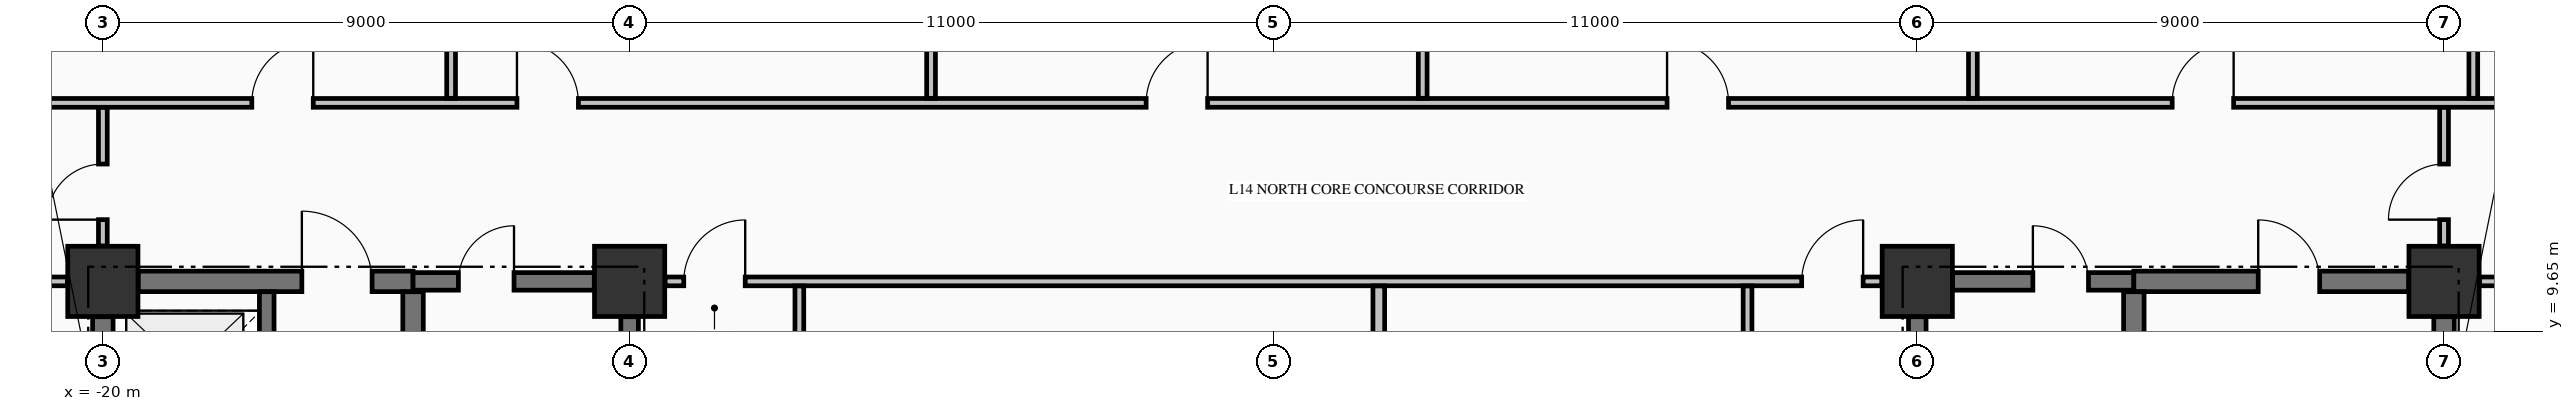
"""IFC4 building model, lengths in metres.
Left out: names, types, materials, properties, quantities, classifications, styles, units other than length and angle.
Written with IfcOpenShell. Run it as: python <this file> out.ifc"""

import sys

from ifc_helpers import new_model, si_unit, direction, frame, frame_2d, origin, origin_2d, place, context, subcontext, project, spatial, rectangle, extrude, element, fill, save


model = new_model("IFC4")
c1 = context("Model", 3, precision=1e-05, world=origin(), true_north=direction((0.0, 1.0)))
c2 = subcontext(c1, "Body", "Model", "MODEL_VIEW")
j1 = project(units=[si_unit("LENGTHUNIT", "METRE"), si_unit("PLANEANGLEUNIT", "RADIAN")], contexts=[c1])
p1 = place(None, origin())
s1 = spatial("IfcSite", under=j1, at=p1, CompositionType="ELEMENT")
p2 = place(p1, origin())
s2 = spatial("IfcBuilding", under=s1, at=p2, CompositionType="ELEMENT")
p3 = place(p2, frame((0.0, 0.0, 60.76)))
s3 = spatial("IfcBuildingStorey", under=s2, at=p3, CompositionType="ELEMENT", Elevation=60.76)
for number, where, z_axis, x_axis in (
    (1, (-20.0, 10.5, -0.3), (0.0, 0.0, 1.0), (1.0, 0.0, 0.0)),
    (2, (-11.0, 10.5, -0.3), (0.0, 0.0, 1.0), (1.0, 0.0, 0.0)),
    (3, (11.0, 10.5, -0.3), (0.0, 0.0, 1.0), (1.0, 0.0, 0.0)),
    (4, (20.0, 10.5, -0.3), (0.0, 0.0, 1.0), (1.0, 0.0, 0.0)),
):
    element("IfcColumn", number, at=place(p3, frame(where, z_axis=z_axis, x_axis=x_axis)), inside=s3, PredefinedType="COLUMN", context=c2, shape_type="SweptSolid", body=[
        extrude(rectangle(XDim=1.2, YDim=1.2, at=origin_2d()), origin(), (0.0, 0.0, 1.0), 3.62),
    ])
p4 = place(p3, frame((-19.396, 10.5, 0.0), z_axis=(0.0, 0.0, 1.0), x_axis=(1.0, 0.0, 0.0)))
e5 = element("IfcWall", 5, at=p4, inside=s3, PredefinedType="SHEAR", context=c2, shape_type="SweptSolid", body=[
    extrude(rectangle(XDim=4.696, YDim=0.35, at=frame_2d((2.348, 0.0))), origin(), (0.0, 0.0, 1.0), 3.32),
])
p5 = place(p4, frame((2.796, 0.0, 0.0)))
e6 = element("IfcOpeningElement", 6, at=p5, cuts=e5, PredefinedType="OPENING", context=c2, shape_type="SweptSolid", body=[
    extrude(rectangle(XDim=1.2, YDim=2.15, at=frame_2d((0.6, 1.075))), frame((0.0, 0.185, 0.0), z_axis=(0.0, -1.0, 0.0), x_axis=(1.0, 0.0, 0.0)), (0.0, 0.0, 1.0), 0.37),
])
p6 = place(p3, frame((-14.7, 10.5, 0.0), z_axis=(0.0, 0.0, 1.0), x_axis=(1.0, 0.0, 0.0)))
e7 = element("IfcWall", 7, at=p6, inside=s3, PredefinedType="SHEAR", context=c2, shape_type="SweptSolid", body=[
    extrude(rectangle(XDim=3.096, YDim=0.3, at=frame_2d((1.548, 0.0))), origin(), (0.0, 0.0, 1.0), 3.32),
])
p7 = place(p6, frame((0.775, 0.0, 0.0)))
e8 = element("IfcOpeningElement", 8, at=p7, cuts=e7, PredefinedType="OPENING", context=c2, shape_type="SweptSolid", body=[
    extrude(rectangle(XDim=0.95, YDim=2.15, at=frame_2d((0.475, 1.075))), frame((0.0, 0.16, 0.0), z_axis=(0.0, -1.0, 0.0), x_axis=(1.0, 0.0, 0.0)), (0.0, 0.0, 1.0), 0.32),
])
p8 = place(p3, frame((11.604, 10.5, 0.0), z_axis=(0.0, 0.0, 1.0), x_axis=(1.0, 0.0, 0.0)))
e9 = element("IfcWall", 9, at=p8, inside=s3, PredefinedType="SHEAR", context=c2, shape_type="SweptSolid", body=[
    extrude(rectangle(XDim=3.096, YDim=0.3, at=frame_2d((1.548, 0.0))), origin(), (0.0, 0.0, 1.0), 3.32),
])
p9 = place(p8, frame((1.371, 0.0, 0.0)))
e10 = element("IfcOpeningElement", 10, at=p9, cuts=e9, PredefinedType="OPENING", context=c2, shape_type="SweptSolid", body=[
    extrude(rectangle(XDim=0.95, YDim=2.15, at=frame_2d((0.475, 1.075))), frame((0.0, 0.16, 0.0), z_axis=(0.0, -1.0, 0.0), x_axis=(1.0, 0.0, 0.0)), (0.0, 0.0, 1.0), 0.32),
])
p10 = place(p3, frame((14.7, 10.5, 0.0), z_axis=(0.0, 0.0, 1.0), x_axis=(1.0, 0.0, 0.0)))
e11 = element("IfcWall", 11, at=p10, inside=s3, PredefinedType="SHEAR", context=c2, shape_type="SweptSolid", body=[
    extrude(rectangle(XDim=4.696, YDim=0.35, at=frame_2d((2.348, 0.0))), origin(), (0.0, 0.0, 1.0), 3.32),
])
p11 = place(p10, frame((2.125, 0.0, 0.0)))
e12 = element("IfcOpeningElement", 12, at=p11, cuts=e11, PredefinedType="OPENING", context=c2, shape_type="SweptSolid", body=[
    extrude(rectangle(XDim=1.05, YDim=2.15, at=frame_2d((0.525, 1.075))), frame((0.0, 0.185, 0.0), z_axis=(0.0, -1.0, 0.0), x_axis=(1.0, 0.0, 0.0)), (0.0, 0.0, 1.0), 0.37),
])
p12 = place(p3, frame((-28.835, 10.5, 0.0), z_axis=(0.0, 0.0, 1.0), x_axis=(1.0, 0.0, 0.0)))
e13 = element("IfcWall", 13, at=p12, inside=s3, PredefinedType="PARTITIONING", context=c2, shape_type="SweptSolid", body=[
    extrude(rectangle(XDim=8.229, YDim=0.15, at=frame_2d((4.115, 0.0))), origin(), (0.0, 0.0, 1.0), 3.32),
])
p13 = place(p12, frame((3.835, 0.0, 0.0)))
e14 = element("IfcOpeningElement", 14, at=p13, cuts=e13, PredefinedType="OPENING", context=c2, shape_type="SweptSolid", body=[
    extrude(rectangle(XDim=1.0, YDim=2.15, at=frame_2d((0.5, 1.075))), frame((0.0, 0.085, 0.0), z_axis=(0.0, -1.0, 0.0), x_axis=(1.0, 0.0, 0.0)), (0.0, 0.0, 1.0), 0.17),
])
p14 = place(p3, frame((-10.394, 10.5, 0.0), z_axis=(0.0, 0.0, 1.0), x_axis=(1.0, 0.0, 0.0)))
e15 = element("IfcWall", 15, at=p14, inside=s3, PredefinedType="PARTITIONING", context=c2, shape_type="SweptSolid", body=[
    extrude(rectangle(XDim=20.788, YDim=0.15, at=frame_2d((10.394, 0.0))), origin(), (0.0, 0.0, 1.0), 3.32),
])
p15 = place(p14, frame((0.319, 0.0, 0.0)))
e16 = element("IfcOpeningElement", 16, at=p15, cuts=e15, PredefinedType="OPENING", context=c2, shape_type="SweptSolid", body=[
    extrude(rectangle(XDim=1.05, YDim=2.15, at=frame_2d((0.525, 1.075))), frame((0.0, 0.085, 0.0), z_axis=(0.0, -1.0, 0.0), x_axis=(1.0, 0.0, 0.0)), (0.0, 0.0, 1.0), 0.17),
])
p16 = place(p14, frame((19.419, 0.0, 0.0)))
e17 = element("IfcOpeningElement", 17, at=p16, cuts=e15, PredefinedType="OPENING", context=c2, shape_type="SweptSolid", body=[
    extrude(rectangle(XDim=1.05, YDim=2.15, at=frame_2d((0.525, 1.075))), frame((0.0, 0.085, 0.0), z_axis=(0.0, -1.0, 0.0), x_axis=(1.0, 0.0, 0.0)), (0.0, 0.0, 1.0), 0.17),
])
p17 = place(p3, frame((20.606, 10.5, 0.0), z_axis=(0.0, 0.0, 1.0), x_axis=(1.0, 0.0, 0.0)))
e18 = element("IfcWall", 18, at=p17, inside=s3, PredefinedType="PARTITIONING", context=c2, shape_type="SweptSolid", body=[
    extrude(rectangle(XDim=3.229, YDim=0.15, at=frame_2d((1.615, 0.0))), origin(), (0.0, 0.0, 1.0), 3.32),
])
p18 = place(p17, frame((0.919, 0.0, 0.0)))
e19 = element("IfcOpeningElement", 19, at=p18, cuts=e18, PredefinedType="OPENING", context=c2, shape_type="SweptSolid", body=[
    extrude(rectangle(XDim=0.95, YDim=2.15, at=frame_2d((0.475, 1.075))), frame((0.0, 0.085, 0.0), z_axis=(0.0, -1.0, 0.0), x_axis=(1.0, 0.0, 0.0)), (0.0, 0.0, 1.0), 0.17),
])
p19 = place(p3, frame((-28.835, 13.55, 0.0), z_axis=(0.0, 0.0, 1.0), x_axis=(1.0, 0.0, 0.0)))
e20 = element("IfcWall", 20, at=p19, inside=s3, PredefinedType="PARTITIONING", context=c2, shape_type="SweptSolid", body=[
    extrude(rectangle(XDim=52.67, YDim=0.15, at=frame_2d((26.335, 0.0))), origin(), (0.0, 0.0, 1.0), 3.32),
])
p20 = place(p19, frame((11.38, 0.0, 0.0)))
e21 = element("IfcOpeningElement", 21, at=p20, cuts=e20, PredefinedType="OPENING", context=c2, shape_type="SweptSolid", body=[
    extrude(rectangle(XDim=1.05, YDim=2.15, at=frame_2d((0.525, 1.075))), frame((0.0, 0.085, 0.0), z_axis=(0.0, -1.0, 0.0), x_axis=(1.0, 0.0, 0.0)), (0.0, 0.0, 1.0), 0.17),
])
p21 = place(p19, frame((15.91, 0.0, 0.0)))
e22 = element("IfcOpeningElement", 22, at=p21, cuts=e20, PredefinedType="OPENING", context=c2, shape_type="SweptSolid", body=[
    extrude(rectangle(XDim=1.05, YDim=2.15, at=frame_2d((0.525, 1.075))), frame((0.0, 0.085, 0.0), z_axis=(0.0, -1.0, 0.0), x_axis=(1.0, 0.0, 0.0)), (0.0, 0.0, 1.0), 0.17),
])
p22 = place(p19, frame((26.66, 0.0, 0.0)))
e23 = element("IfcOpeningElement", 23, at=p22, cuts=e20, PredefinedType="OPENING", context=c2, shape_type="SweptSolid", body=[
    extrude(rectangle(XDim=1.05, YDim=2.15, at=frame_2d((0.525, 1.075))), frame((0.0, 0.085, 0.0), z_axis=(0.0, -1.0, 0.0), x_axis=(1.0, 0.0, 0.0)), (0.0, 0.0, 1.0), 0.17),
])
p23 = place(p19, frame((35.56, 0.0, 0.0)))
e24 = element("IfcOpeningElement", 24, at=p23, cuts=e20, PredefinedType="OPENING", context=c2, shape_type="SweptSolid", body=[
    extrude(rectangle(XDim=1.05, YDim=2.15, at=frame_2d((0.525, 1.075))), frame((0.0, 0.085, 0.0), z_axis=(0.0, -1.0, 0.0), x_axis=(1.0, 0.0, 0.0)), (0.0, 0.0, 1.0), 0.17),
])
p24 = place(p19, frame((44.19, 0.0, 0.0)))
e25 = element("IfcOpeningElement", 25, at=p24, cuts=e20, PredefinedType="OPENING", context=c2, shape_type="SweptSolid", body=[
    extrude(rectangle(XDim=1.05, YDim=2.15, at=frame_2d((0.525, 1.075))), frame((0.0, 0.085, 0.0), z_axis=(0.0, -1.0, 0.0), x_axis=(1.0, 0.0, 0.0)), (0.0, 0.0, 1.0), 0.17),
])
p25 = place(p3, frame((-20.0, 7.727, 0.0), z_axis=(0.0, 0.0, 1.0), x_axis=(0.0, 1.0, 0.0)))
e26 = element("IfcWall", 26, at=p25, inside=s3, PredefinedType="SHEAR", context=c2, shape_type="SweptSolid", body=[
    extrude(rectangle(XDim=2.169, YDim=0.35, at=frame_2d((1.084, 0.0))), origin(), (0.0, 0.0, 1.0), 3.32),
])
p26 = place(p3, frame((-17.2, 7.727, 0.0), z_axis=(0.0, 0.0, 1.0), x_axis=(0.0, 1.0, 0.0)))
e27 = element("IfcWall", 27, at=p26, inside=s3, PredefinedType="SOLIDWALL", context=c2, shape_type="SweptSolid", body=[
    extrude(rectangle(XDim=2.596, YDim=0.25, at=frame_2d((1.298, 0.0))), origin(), (0.0, 0.0, 1.0), 3.32),
])
p27 = place(p26, frame((0.773, 0.0, 0.0)))
e28 = element("IfcOpeningElement", 28, at=p27, cuts=e27, PredefinedType="OPENING", context=c2, shape_type="SweptSolid", body=[
    extrude(rectangle(XDim=1.1, YDim=2.2, at=frame_2d((0.55, 1.1))), frame((0.0, 0.135, 0.0), z_axis=(0.0, -1.0, 0.0), x_axis=(1.0, 0.0, 0.0)), (0.0, 0.0, 1.0), 0.27),
])
p28 = place(p3, frame((-14.7, 5.852, 0.0), z_axis=(0.0, 0.0, 1.0), x_axis=(0.0, 1.0, 0.0)))
e29 = element("IfcWall", 29, at=p28, inside=s3, PredefinedType="SHEAR", context=c2, shape_type="SweptSolid", body=[
    extrude(rectangle(XDim=4.471, YDim=0.35, at=frame_2d((2.235, 0.0))), origin(), (0.0, 0.0, 1.0), 3.32),
])
for number, where, z_axis, x_axis in (
    (30, (-11.0, 5.852, 0.0), (0.0, 0.0, 1.0), (0.0, 1.0, 0.0)),
    (31, (11.0, 5.852, 0.0), (0.0, 0.0, 1.0), (0.0, 1.0, 0.0)),
):
    element("IfcWall", number, at=place(p3, frame(where, z_axis=z_axis, x_axis=x_axis)), inside=s3, PredefinedType="SHEAR", context=c2, shape_type="SweptSolid", body=[
        extrude(rectangle(XDim=4.044, YDim=0.3, at=frame_2d((2.022, 0.0))), origin(), (0.0, 0.0, 1.0), 3.32),
    ])
p29 = place(p3, frame((14.7, 5.852, 0.0), z_axis=(0.0, 0.0, 1.0), x_axis=(0.0, 1.0, 0.0)))
e32 = element("IfcWall", 32, at=p29, inside=s3, PredefinedType="SHEAR", context=c2, shape_type="SweptSolid", body=[
    extrude(rectangle(XDim=4.471, YDim=0.35, at=frame_2d((2.235, 0.0))), origin(), (0.0, 0.0, 1.0), 3.32),
])
p30 = place(p3, frame((20.0, 0.604, 0.0), z_axis=(0.0, 0.0, 1.0), x_axis=(0.0, 1.0, 0.0)))
e33 = element("IfcWall", 33, at=p30, inside=s3, PredefinedType="SHEAR", context=c2, shape_type="SweptSolid", body=[
    extrude(rectangle(XDim=9.292, YDim=0.35, at=frame_2d((4.646, 0.0))), origin(), (0.0, 0.0, 1.0), 3.32),
])
p31 = place(p3, frame((-20.0, 11.106, 0.0), z_axis=(0.0, 0.0, 1.0), x_axis=(0.0, 1.0, 0.0)))
e34 = element("IfcWall", 34, at=p31, inside=s3, PredefinedType="PARTITIONING", context=c2, shape_type="SweptSolid", body=[
    extrude(rectangle(XDim=2.366, YDim=0.15, at=frame_2d((1.183, 0.0))), origin(), (0.0, 0.0, 1.0), 2.66),
])
p32 = place(p31, frame((0.449, 0.0, 0.0)))
e35 = element("IfcOpeningElement", 35, at=p32, cuts=e34, PredefinedType="OPENING", context=c2, shape_type="SweptSolid", body=[
    extrude(rectangle(XDim=0.95, YDim=2.15, at=frame_2d((0.475, 1.075))), frame((0.0, 0.085, 0.0), z_axis=(0.0, -1.0, 0.0), x_axis=(1.0, 0.0, 0.0)), (0.0, 0.0, 1.0), 0.17),
])
p33 = place(p3, frame((-14.05, 13.628, 0.0), z_axis=(0.0, 0.0, 1.0), x_axis=(0.0, 1.0, 0.0)))
e36 = element("IfcWall", 36, at=p33, inside=s3, PredefinedType="PARTITIONING", context=c2, shape_type="SweptSolid", body=[
    extrude(rectangle(XDim=12.707, YDim=0.15, at=frame_2d((6.354, 0.0))), origin(), (0.0, 0.0, 1.0), 3.32),
])
p34 = place(p3, frame((-8.1, -3.897, 0.0), z_axis=(0.0, 0.0, 1.0), x_axis=(0.0, 1.0, 0.0)))
e37 = element("IfcWall", 37, at=p34, inside=s3, PredefinedType="PARTITIONING", context=c2, shape_type="SweptSolid", body=[
    extrude(rectangle(XDim=14.319, YDim=0.15, at=frame_2d((7.16, 0.0))), origin(), (0.0, 0.0, 1.0), 3.32),
])
p35 = place(p34, frame((6.622, 0.0, 0.0)))
e38 = element("IfcOpeningElement", 38, at=p35, cuts=e37, PredefinedType="OPENING", context=c2, shape_type="SweptSolid", body=[
    extrude(rectangle(XDim=1.05, YDim=2.15, at=frame_2d((0.525, 1.075))), frame((0.0, 0.085, 0.0), z_axis=(0.0, -1.0, 0.0), x_axis=(1.0, 0.0, 0.0)), (0.0, 0.0, 1.0), 0.17),
])
p36 = place(p3, frame((-5.85, 13.628, 0.0), z_axis=(0.0, 0.0, 1.0), x_axis=(0.0, 1.0, 0.0)))
e39 = element("IfcWall", 39, at=p36, inside=s3, PredefinedType="PARTITIONING", context=c2, shape_type="SweptSolid", body=[
    extrude(rectangle(XDim=12.707, YDim=0.15, at=frame_2d((6.354, 0.0))), origin(), (0.0, 0.0, 1.0), 3.32),
])
p37 = place(p3, frame((1.8, 0.303, 0.0), z_axis=(0.0, 0.0, 1.0), x_axis=(0.0, 1.0, 0.0)))
e40 = element("IfcWall", 40, at=p37, inside=s3, PredefinedType="PARTITIONING", context=c2, shape_type="SweptSolid", body=[
    extrude(rectangle(XDim=10.119, YDim=0.2, at=frame_2d((5.06, 0.0))), origin(), (0.0, 0.0, 1.0), 3.32),
])
p38 = place(p3, frame((2.55, 13.628, 0.0), z_axis=(0.0, 0.0, 1.0), x_axis=(0.0, 1.0, 0.0)))
e41 = element("IfcWall", 41, at=p38, inside=s3, PredefinedType="PARTITIONING", context=c2, shape_type="SweptSolid", body=[
    extrude(rectangle(XDim=12.707, YDim=0.15, at=frame_2d((6.354, 0.0))), origin(), (0.0, 0.0, 1.0), 3.32),
])
p39 = place(p3, frame((8.1, 0.303, 0.0), z_axis=(0.0, 0.0, 1.0), x_axis=(0.0, 1.0, 0.0)))
e42 = element("IfcWall", 42, at=p39, inside=s3, PredefinedType="PARTITIONING", context=c2, shape_type="SweptSolid", body=[
    extrude(rectangle(XDim=10.119, YDim=0.15, at=frame_2d((5.06, 0.0))), origin(), (0.0, 0.0, 1.0), 3.32),
])
p40 = place(p39, frame((4.497, 0.0, 0.0)))
e43 = element("IfcOpeningElement", 43, at=p40, cuts=e42, PredefinedType="OPENING", context=c2, shape_type="SweptSolid", body=[
    extrude(rectangle(XDim=1.1, YDim=2.15, at=frame_2d((0.55, 1.075))), frame((0.0, 0.085, 0.0), z_axis=(0.0, -1.0, 0.0), x_axis=(1.0, 0.0, 0.0)), (0.0, 0.0, 1.0), 0.17),
])
p41 = place(p3, frame((11.95, 13.628, 0.0), z_axis=(0.0, 0.0, 1.0), x_axis=(0.0, 1.0, 0.0)))
e44 = element("IfcWall", 44, at=p41, inside=s3, PredefinedType="PARTITIONING", context=c2, shape_type="SweptSolid", body=[
    extrude(rectangle(XDim=12.707, YDim=0.15, at=frame_2d((6.354, 0.0))), origin(), (0.0, 0.0, 1.0), 3.32),
])
p42 = place(p3, frame((20.0, 11.106, 0.0), z_axis=(0.0, 0.0, 1.0), x_axis=(0.0, 1.0, 0.0)))
e45 = element("IfcWall", 45, at=p42, inside=s3, PredefinedType="PARTITIONING", context=c2, shape_type="SweptSolid", body=[
    extrude(rectangle(XDim=2.366, YDim=0.15, at=frame_2d((1.183, 0.0))), origin(), (0.0, 0.0, 1.0), 3.32),
])
p43 = place(p42, frame((0.449, 0.0, 0.0)))
e46 = element("IfcOpeningElement", 46, at=p43, cuts=e45, PredefinedType="OPENING", context=c2, shape_type="SweptSolid", body=[
    extrude(rectangle(XDim=0.95, YDim=2.15, at=frame_2d((0.475, 1.075))), frame((0.0, 0.085, 0.0), z_axis=(0.0, -1.0, 0.0), x_axis=(1.0, 0.0, 0.0)), (0.0, 0.0, 1.0), 0.17),
])
p44 = place(p3, frame((20.5, 13.628, 0.0), z_axis=(0.0, 0.0, 1.0), x_axis=(0.0, 1.0, 0.0)))
e47 = element("IfcWall", 47, at=p44, inside=s3, PredefinedType="PARTITIONING", context=c2, shape_type="SweptSolid", body=[
    extrude(rectangle(XDim=8.666, YDim=0.15, at=frame_2d((4.333, 0.0))), origin(), (0.0, 0.0, 1.0), 3.32),
])
p45 = place(p7, origin())
e48 = element("IfcDoor", 48, at=p45, inside=s3, OperationType="SINGLE_SWING_RIGHT", PredefinedType="DOOR", context=c2, shape_type="SweptSolid", body=[
    extrude(rectangle(XDim=0.95, YDim=2.15, at=frame_2d((0.475, 1.075))), frame((0.0, 0.025, 0.0), z_axis=(0.0, -1.0, 0.0), x_axis=(1.0, 0.0, 0.0)), (0.0, 0.0, 1.0), 0.05),
])
fill(e8, e48)
p46 = place(p9, origin())
e49 = element("IfcDoor", 49, at=p46, inside=s3, OperationType="SINGLE_SWING_LEFT", PredefinedType="DOOR", context=c2, shape_type="SweptSolid", body=[
    extrude(rectangle(XDim=0.95, YDim=2.15, at=frame_2d((0.475, 1.075))), frame((0.0, 0.025, 0.0), z_axis=(0.0, -1.0, 0.0), x_axis=(1.0, 0.0, 0.0)), (0.0, 0.0, 1.0), 0.05),
])
fill(e10, e49)
p47 = place(p5, origin())
e50 = element("IfcDoor", 50, at=p47, inside=s3, OperationType="SINGLE_SWING_LEFT", PredefinedType="DOOR", context=c2, shape_type="SweptSolid", body=[
    extrude(rectangle(XDim=1.2, YDim=2.15, at=frame_2d((0.6, 1.075))), frame((0.0, 0.025, 0.0), z_axis=(0.0, -1.0, 0.0), x_axis=(1.0, 0.0, 0.0)), (0.0, 0.0, 1.0), 0.05),
])
fill(e6, e50)
p48 = place(p11, origin())
e51 = element("IfcDoor", 51, at=p48, inside=s3, OperationType="SINGLE_SWING_LEFT", PredefinedType="DOOR", context=c2, shape_type="SweptSolid", body=[
    extrude(rectangle(XDim=1.05, YDim=2.15, at=frame_2d((0.525, 1.075))), frame((0.0, 0.025, 0.0), z_axis=(0.0, -1.0, 0.0), x_axis=(1.0, 0.0, 0.0)), (0.0, 0.0, 1.0), 0.05),
])
fill(e12, e51)
p49 = place(p15, origin())
e52 = element("IfcDoor", 52, at=p49, inside=s3, OperationType="SINGLE_SWING_RIGHT", PredefinedType="DOOR", context=c2, shape_type="SweptSolid", body=[
    extrude(rectangle(XDim=1.05, YDim=2.15, at=frame_2d((0.525, 1.075))), frame((0.0, 0.025, 0.0), z_axis=(0.0, -1.0, 0.0), x_axis=(1.0, 0.0, 0.0)), (0.0, 0.0, 1.0), 0.05),
])
fill(e16, e52)
p50 = place(p16, origin())
e53 = element("IfcDoor", 53, at=p50, inside=s3, OperationType="SINGLE_SWING_RIGHT", PredefinedType="DOOR", context=c2, shape_type="SweptSolid", body=[
    extrude(rectangle(XDim=1.05, YDim=2.15, at=frame_2d((0.525, 1.075))), frame((0.0, 0.025, 0.0), z_axis=(0.0, -1.0, 0.0), x_axis=(1.0, 0.0, 0.0)), (0.0, 0.0, 1.0), 0.05),
])
fill(e17, e53)
p51 = place(p20, origin())
e54 = element("IfcDoor", 54, at=p51, inside=s3, OperationType="SINGLE_SWING_RIGHT", PredefinedType="DOOR", context=c2, shape_type="SweptSolid", body=[
    extrude(rectangle(XDim=1.05, YDim=2.15, at=frame_2d((0.525, 1.075))), frame((0.0, 0.025, 0.0), z_axis=(0.0, -1.0, 0.0), x_axis=(1.0, 0.0, 0.0)), (0.0, 0.0, 1.0), 0.05),
])
fill(e21, e54)
p52 = place(p21, origin())
e55 = element("IfcDoor", 55, at=p52, inside=s3, OperationType="SINGLE_SWING_LEFT", PredefinedType="DOOR", context=c2, shape_type="SweptSolid", body=[
    extrude(rectangle(XDim=1.05, YDim=2.15, at=frame_2d((0.525, 1.075))), frame((0.0, 0.025, 0.0), z_axis=(0.0, -1.0, 0.0), x_axis=(1.0, 0.0, 0.0)), (0.0, 0.0, 1.0), 0.05),
])
fill(e22, e55)
p53 = place(p22, origin())
e56 = element("IfcDoor", 56, at=p53, inside=s3, OperationType="SINGLE_SWING_RIGHT", PredefinedType="DOOR", context=c2, shape_type="SweptSolid", body=[
    extrude(rectangle(XDim=1.05, YDim=2.15, at=frame_2d((0.525, 1.075))), frame((0.0, 0.025, 0.0), z_axis=(0.0, -1.0, 0.0), x_axis=(1.0, 0.0, 0.0)), (0.0, 0.0, 1.0), 0.05),
])
fill(e23, e56)
p54 = place(p23, origin())
e57 = element("IfcDoor", 57, at=p54, inside=s3, OperationType="SINGLE_SWING_LEFT", PredefinedType="DOOR", context=c2, shape_type="SweptSolid", body=[
    extrude(rectangle(XDim=1.05, YDim=2.15, at=frame_2d((0.525, 1.075))), frame((0.0, 0.025, 0.0), z_axis=(0.0, -1.0, 0.0), x_axis=(1.0, 0.0, 0.0)), (0.0, 0.0, 1.0), 0.05),
])
fill(e24, e57)
p55 = place(p24, origin())
e58 = element("IfcDoor", 58, at=p55, inside=s3, OperationType="SINGLE_SWING_RIGHT", PredefinedType="DOOR", context=c2, shape_type="SweptSolid", body=[
    extrude(rectangle(XDim=1.05, YDim=2.15, at=frame_2d((0.525, 1.075))), frame((0.0, 0.025, 0.0), z_axis=(0.0, -1.0, 0.0), x_axis=(1.0, 0.0, 0.0)), (0.0, 0.0, 1.0), 0.05),
])
fill(e25, e58)
p56 = place(p32, origin())
e59 = element("IfcDoor", 59, at=p56, inside=s3, OperationType="SINGLE_SWING_LEFT", PredefinedType="DOOR", context=c2, shape_type="SweptSolid", body=[
    extrude(rectangle(XDim=0.95, YDim=2.15, at=frame_2d((0.475, 1.075))), frame((0.0, 0.025, 0.0), z_axis=(0.0, -1.0, 0.0), x_axis=(1.0, 0.0, 0.0)), (0.0, 0.0, 1.0), 0.05),
])
fill(e35, e59)
p57 = place(p43, origin())
e60 = element("IfcDoor", 60, at=p57, inside=s3, OperationType="SINGLE_SWING_LEFT", PredefinedType="DOOR", context=c2, shape_type="SweptSolid", body=[
    extrude(rectangle(XDim=0.95, YDim=2.15, at=frame_2d((0.475, 1.075))), frame((0.0, 0.025, 0.0), z_axis=(0.0, -1.0, 0.0), x_axis=(1.0, 0.0, 0.0)), (0.0, 0.0, 1.0), 0.05),
])
fill(e46, e60)
save(model, sys.argv[1])
